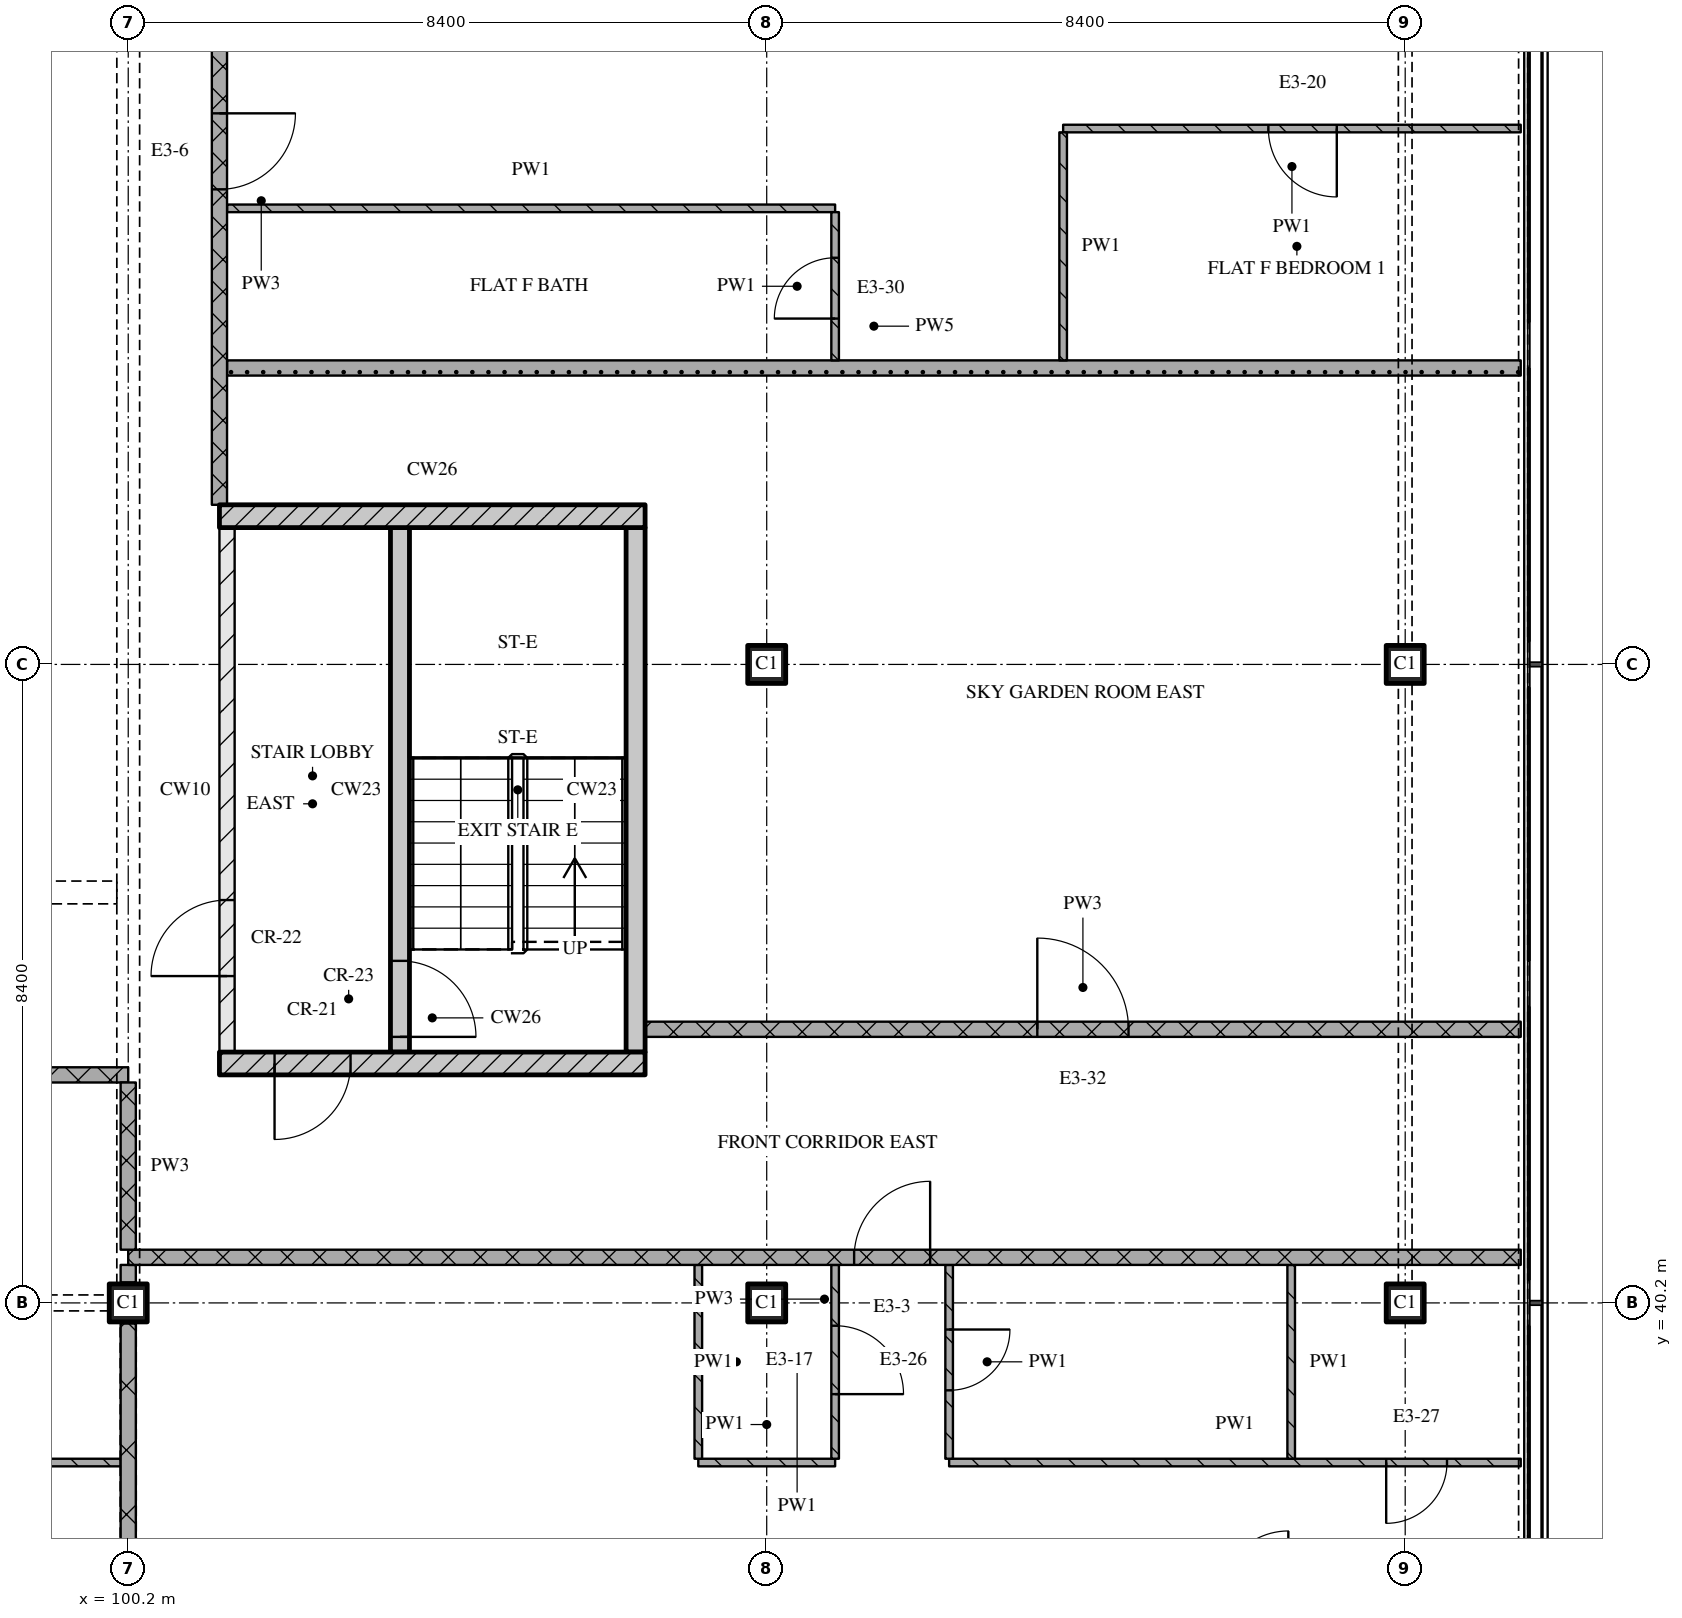
"""IFC4 building model, lengths in metres.
Left out: names, types, materials, properties, quantities, classifications, styles, units other than length and angle.
Written with IfcOpenShell. Run it as: python <this file> out.ifc"""

import sys

from ifc_helpers import new_model, si_unit, direction, frame, frame_2d, origin, origin_2d, place, context, subcontext, project, spatial, rectangle, extrude, element, fill, save


model = new_model("IFC4")
c1 = context("Model", 3, precision=1e-05, world=origin(), true_north=direction((0.0, 1.0)))
c2 = subcontext(c1, "Body", "Model", "MODEL_VIEW")
j1 = project(units=[si_unit("LENGTHUNIT", "METRE"), si_unit("PLANEANGLEUNIT", "RADIAN")], contexts=[c1])
p1 = place(None, origin())
s1 = spatial("IfcSite", under=j1, at=p1, CompositionType="ELEMENT")
p2 = place(p1, origin())
s2 = spatial("IfcBuilding", under=s1, at=p2, CompositionType="ELEMENT")
p3 = place(p2, frame((0.0, 0.0, 281.55)))
s3 = spatial("IfcBuildingStorey", under=s2, at=p3, CompositionType="ELEMENT", Elevation=281.55)
for number, where, z_axis, x_axis in (
    (1, (100.2, 40.2, 0.0), (0.0, 0.0, 1.0), (1.0, 0.0, 0.0)),
    (2, (108.6, 40.2, 0.0), (0.0, 0.0, 1.0), (1.0, 0.0, 0.0)),
    (3, (108.6, 48.6, 0.0), (0.0, 0.0, 1.0), (1.0, 0.0, 0.0)),
    (4, (117.0, 40.2, 0.0), (0.0, 0.0, 1.0), (1.0, 0.0, 0.0)),
    (5, (117.0, 48.6, 0.0), (0.0, 0.0, 1.0), (1.0, 0.0, 0.0)),
):
    element("IfcColumn", number, at=place(p3, frame(where, z_axis=z_axis, x_axis=x_axis)), inside=s3, PredefinedType="COLUMN", context=c2, shape_type="SweptSolid", body=[
        extrude(rectangle(XDim=0.5, YDim=0.5, at=origin_2d()), origin(), (0.0, 0.0, 1.0), 3.6),
    ])
p4 = place(p3, frame((101.4, 43.35, 0.0), z_axis=(0.0, 0.0, 1.0), x_axis=(1.0, 0.0, 0.0)))
e6 = element("IfcWall", 6, at=p4, inside=s3, PredefinedType="SOLIDWALL", context=c2, shape_type="SweptSolid", body=[
    extrude(rectangle(XDim=5.6, YDim=0.3, at=frame_2d((2.8, 0.0))), origin(), (0.0, 0.0, 1.0), 3.32),
])
p5 = place(p4, frame((0.725, 0.0, 0.0)))
e7 = element("IfcOpeningElement", 7, at=p5, cuts=e6, PredefinedType="OPENING", context=c2, shape_type="SweptSolid", body=[
    extrude(rectangle(XDim=1.0, YDim=2.1, at=frame_2d((0.5, 1.05))), frame((0.0, 0.16, 0.0), z_axis=(0.0, -1.0, 0.0), x_axis=(1.0, 0.0, 0.0)), (0.0, 0.0, 1.0), 0.32),
])
p6 = place(p3, frame((101.5, 43.5, 0.0), z_axis=(0.0, 0.0, 1.0), x_axis=(0.0, 1.0, 0.0)))
e8 = element("IfcWall", 8, at=p6, inside=s3, PredefinedType="PARTITIONING", context=c2, shape_type="SweptSolid", body=[
    extrude(rectangle(XDim=6.9, YDim=0.2, at=frame_2d((3.45, 0.0))), origin(), (0.0, 0.0, 1.0), 3.32),
])
p7 = place(p6, frame((1.0, 0.0, 0.0)))
e9 = element("IfcOpeningElement", 9, at=p7, cuts=e8, PredefinedType="OPENING", context=c2, shape_type="SweptSolid", body=[
    extrude(rectangle(XDim=1.0, YDim=2.1, at=frame_2d((0.5, 1.05))), frame((0.0, 0.11, 0.0), z_axis=(0.0, -1.0, 0.0), x_axis=(1.0, 0.0, 0.0)), (0.0, 0.0, 1.0), 0.22),
])
p8 = place(p3, frame((103.775, 43.5, 0.0), z_axis=(0.0, 0.0, 1.0), x_axis=(0.0, 1.0, 0.0)))
e10 = element("IfcWall", 10, at=p8, inside=s3, PredefinedType="SOLIDWALL", context=c2, shape_type="SweptSolid", body=[
    extrude(rectangle(XDim=6.9, YDim=0.25, at=frame_2d((3.45, 0.0))), origin(), (0.0, 0.0, 1.0), 3.32),
])
p9 = place(p8, frame((0.2, 0.0, 0.0)))
e11 = element("IfcOpeningElement", 11, at=p9, cuts=e10, PredefinedType="OPENING", context=c2, shape_type="SweptSolid", body=[
    extrude(rectangle(XDim=1.0, YDim=2.1, at=frame_2d((0.5, 1.05))), frame((0.0, 0.135, 0.0), z_axis=(0.0, -1.0, 0.0), x_axis=(1.0, 0.0, 0.0)), (0.0, 0.0, 1.0), 0.27),
])
p10 = place(p3, frame((106.875, 43.5, 0.0), z_axis=(0.0, 0.0, 1.0), x_axis=(0.0, 1.0, 0.0)))
e12 = element("IfcWall", 12, at=p10, inside=s3, PredefinedType="SOLIDWALL", context=c2, shape_type="SweptSolid", body=[
    extrude(rectangle(XDim=6.9, YDim=0.25, at=frame_2d((3.45, 0.0))), origin(), (0.0, 0.0, 1.0), 3.32),
])
p11 = place(p3, frame((101.4, 50.55, 0.0), z_axis=(0.0, 0.0, 1.0), x_axis=(1.0, 0.0, 0.0)))
e13 = element("IfcWall", 13, at=p11, inside=s3, PredefinedType="SOLIDWALL", context=c2, shape_type="SweptSolid", body=[
    extrude(rectangle(XDim=5.6, YDim=0.3, at=frame_2d((2.8, 0.0))), origin(), (0.0, 0.0, 1.0), 3.32),
])
p12 = place(p3, frame((90.6, 38.1, 0.0), z_axis=(0.0, 0.0, 1.0), x_axis=(1.0, 0.0, 0.0)))
e14 = element("IfcWall", 14, at=p12, inside=s3, PredefinedType="PARTITIONING", context=c2, shape_type="SweptSolid", body=[
    extrude(rectangle(XDim=9.5, YDim=0.1, at=frame_2d((4.75, 0.0))), origin(), (0.0, 0.0, 1.0), 3.32),
])
p13 = place(p12, frame((4.35, 0.0, 0.0)))
e15 = element("IfcOpeningElement", 15, at=p13, cuts=e14, PredefinedType="OPENING", context=c2, shape_type="SweptSolid", body=[
    extrude(rectangle(XDim=0.9, YDim=2.1, at=frame_2d((0.45, 1.05))), frame((0.0, 0.06, 0.0), z_axis=(0.0, -1.0, 0.0), x_axis=(1.0, 0.0, 0.0)), (0.0, 0.0, 1.0), 0.12),
])
p14 = place(p3, frame((107.7, 38.1, 0.0), z_axis=(0.0, 0.0, 1.0), x_axis=(1.0, 0.0, 0.0)))
e16 = element("IfcWall", 16, at=p14, inside=s3, PredefinedType="PARTITIONING", context=c2, shape_type="SweptSolid", body=[
    extrude(rectangle(XDim=1.8, YDim=0.1, at=frame_2d((0.9, 0.0))), origin(), (0.0, 0.0, 1.0), 3.32),
])
p15 = place(p3, frame((111.0, 38.1, 0.0), z_axis=(0.0, 0.0, 1.0), x_axis=(1.0, 0.0, 0.0)))
e17 = element("IfcWall", 17, at=p15, inside=s3, PredefinedType="PARTITIONING", context=c2, shape_type="SweptSolid", body=[
    extrude(rectangle(XDim=7.52, YDim=0.1, at=frame_2d((3.76, 0.0))), origin(), (0.0, 0.0, 1.0), 3.32),
])
p16 = place(p15, frame((5.75, 0.0, 0.0)))
e18 = element("IfcOpeningElement", 18, at=p16, cuts=e17, PredefinedType="OPENING", context=c2, shape_type="SweptSolid", body=[
    extrude(rectangle(XDim=0.8, YDim=2.1, at=frame_2d((0.4, 1.05))), frame((0.0, 0.06, 0.0), z_axis=(0.0, -1.0, 0.0), x_axis=(1.0, 0.0, 0.0)), (0.0, 0.0, 1.0), 0.12),
])
p17 = place(p3, frame((118.52, 40.8, 0.0), z_axis=(0.0, 0.0, 1.0), x_axis=(-1.0, 0.0, 0.0)))
e19 = element("IfcWall", 19, at=p17, inside=s3, PredefinedType="PARTITIONING", context=c2, shape_type="SweptSolid", body=[
    extrude(rectangle(XDim=18.32, YDim=0.2, at=frame_2d((9.16, 0.0))), origin(), (0.0, 0.0, 1.0), 3.32),
])
p18 = place(p17, frame((7.77, 0.0, 0.0)))
e20 = element("IfcOpeningElement", 20, at=p18, cuts=e19, PredefinedType="OPENING", context=c2, shape_type="SweptSolid", body=[
    extrude(rectangle(XDim=1.0, YDim=2.1, at=frame_2d((0.5, 1.05))), frame((0.0, 0.11, 0.0), z_axis=(0.0, -1.0, 0.0), x_axis=(1.0, 0.0, 0.0)), (0.0, 0.0, 1.0), 0.22),
])
p19 = place(p3, frame((100.2, 43.2, 0.0), z_axis=(0.0, 0.0, 1.0), x_axis=(-1.0, 0.0, 0.0)))
e21 = element("IfcWall", 21, at=p19, inside=s3, PredefinedType="PARTITIONING", context=c2, shape_type="SweptSolid", body=[
    extrude(rectangle(XDim=25.2, YDim=0.2, at=frame_2d((12.6, 0.0))), origin(), (0.0, 0.0, 1.0), 3.32),
])
p20 = place(p19, frame((17.35, 0.0, 0.0)))
e22 = element("IfcOpeningElement", 22, at=p20, cuts=e21, PredefinedType="OPENING", context=c2, shape_type="SweptSolid", body=[
    extrude(rectangle(XDim=1.0, YDim=2.1, at=frame_2d((0.5, 1.05))), frame((0.0, 0.11, 0.0), z_axis=(0.0, -1.0, 0.0), x_axis=(1.0, 0.0, 0.0)), (0.0, 0.0, 1.0), 0.22),
])
p21 = place(p3, frame((107.0, 43.8, 0.0), z_axis=(0.0, 0.0, 1.0), x_axis=(1.0, 0.0, 0.0)))
e23 = element("IfcWall", 23, at=p21, inside=s3, PredefinedType="PARTITIONING", context=c2, shape_type="SweptSolid", body=[
    extrude(rectangle(XDim=11.52, YDim=0.2, at=frame_2d((5.76, 0.0))), origin(), (0.0, 0.0, 1.0), 3.32),
])
p22 = place(p21, frame((5.16, 0.0, 0.0)))
e24 = element("IfcOpeningElement", 24, at=p22, cuts=e23, PredefinedType="OPENING", context=c2, shape_type="SweptSolid", body=[
    extrude(rectangle(XDim=1.2, YDim=2.1, at=frame_2d((0.6, 1.05))), frame((0.0, 0.11, 0.0), z_axis=(0.0, -1.0, 0.0), x_axis=(1.0, 0.0, 0.0)), (0.0, 0.0, 1.0), 0.22),
])
p23 = place(p3, frame((101.5, 52.5, 0.0), z_axis=(0.0, 0.0, 1.0), x_axis=(1.0, 0.0, 0.0)))
e25 = element("IfcWall", 25, at=p23, inside=s3, PredefinedType="PARTITIONING", context=c2, shape_type="SweptSolid", body=[
    extrude(rectangle(XDim=17.02, YDim=0.2, at=frame_2d((8.51, 0.0))), origin(), (0.0, 0.0, 1.0), 3.32),
])
p24 = place(p3, frame((101.5, 54.6, 0.0), z_axis=(0.0, 0.0, 1.0), x_axis=(1.0, 0.0, 0.0)))
e26 = element("IfcWall", 26, at=p24, inside=s3, PredefinedType="PARTITIONING", context=c2, shape_type="SweptSolid", body=[
    extrude(rectangle(XDim=8.0, YDim=0.1, at=frame_2d((4.0, 0.0))), origin(), (0.0, 0.0, 1.0), 3.32),
])
p25 = place(p3, frame((118.52, 55.65, 0.0), z_axis=(0.0, 0.0, 1.0), x_axis=(-1.0, 0.0, 0.0)))
e27 = element("IfcWall", 27, at=p25, inside=s3, PredefinedType="PARTITIONING", context=c2, shape_type="SweptSolid", body=[
    extrude(rectangle(XDim=6.02, YDim=0.1, at=frame_2d((3.01, 0.0))), origin(), (0.0, 0.0, 1.0), 3.32),
])
p26 = place(p25, frame((2.42, 0.0, 0.0)))
e28 = element("IfcOpeningElement", 28, at=p26, cuts=e27, PredefinedType="OPENING", context=c2, shape_type="SweptSolid", body=[
    extrude(rectangle(XDim=0.9, YDim=2.1, at=frame_2d((0.45, 1.05))), frame((0.0, 0.06, 0.0), z_axis=(0.0, -1.0, 0.0), x_axis=(1.0, 0.0, 0.0)), (0.0, 0.0, 1.0), 0.12),
])
p27 = place(p3, frame((100.2, 43.1, 0.0), z_axis=(0.0, 0.0, 1.0), x_axis=(0.0, -1.0, 0.0)))
e29 = element("IfcWall", 29, at=p27, inside=s3, PredefinedType="PARTITIONING", context=c2, shape_type="SweptSolid", body=[
    extrude(rectangle(XDim=2.2, YDim=0.2, at=frame_2d((1.1, 0.0))), origin(), (0.0, 0.0, 1.0), 2.53),
])
p28 = place(p3, frame((100.2, 39.93, 0.0), z_axis=(0.0, 0.0, 1.0), x_axis=(0.0, -1.0, 0.0)))
e30 = element("IfcWall", 30, at=p28, inside=s3, PredefinedType="PARTITIONING", context=c2, shape_type="SweptSolid", body=[
    extrude(rectangle(XDim=7.86, YDim=0.2, at=frame_2d((3.93, 0.0))), origin(), (0.0, 0.0, 1.0), 2.83),
])
p29 = place(p3, frame((100.2, 40.7, 0.0), z_axis=(0.0, 0.0, 1.0), x_axis=(0.0, -1.0, 0.0)))
e31 = element("IfcWall", 31, at=p29, inside=s3, PredefinedType="PARTITIONING", context=c2, shape_type="SweptSolid", body=[
    extrude(rectangle(XDim=0.23, YDim=0.2, at=frame_2d((0.115, 0.0))), origin(), (0.0, 0.0, 1.0), 3.32),
])
p30 = place(p3, frame((101.4, 58.7, 0.0), z_axis=(0.0, 0.0, 1.0), x_axis=(0.0, -1.0, 0.0)))
e32 = element("IfcWall", 32, at=p30, inside=s3, PredefinedType="PARTITIONING", context=c2, shape_type="SweptSolid", body=[
    extrude(rectangle(XDim=8.0, YDim=0.2, at=frame_2d((4.0, 0.0))), origin(), (0.0, 0.0, 1.0), 3.32),
])
p31 = place(p30, frame((2.85, 0.0, 0.0)))
e33 = element("IfcOpeningElement", 33, at=p31, cuts=e32, PredefinedType="OPENING", context=c2, shape_type="SweptSolid", body=[
    extrude(rectangle(XDim=1.0, YDim=2.1, at=frame_2d((0.5, 1.05))), frame((0.0, 0.11, 0.0), z_axis=(0.0, -1.0, 0.0), x_axis=(1.0, 0.0, 0.0)), (0.0, 0.0, 1.0), 0.22),
])
p32 = place(p3, frame((107.7, 40.7, 0.0), z_axis=(0.0, 0.0, 1.0), x_axis=(0.0, -1.0, 0.0)))
e34 = element("IfcWall", 34, at=p32, inside=s3, PredefinedType="PARTITIONING", context=c2, shape_type="SweptSolid", body=[
    extrude(rectangle(XDim=2.55, YDim=0.1, at=frame_2d((1.275, 0.0))), origin(), (0.0, 0.0, 1.0), 3.32),
])
p33 = place(p3, frame((109.5, 38.15, 0.0), z_axis=(0.0, 0.0, 1.0), x_axis=(0.0, 1.0, 0.0)))
e35 = element("IfcWall", 35, at=p33, inside=s3, PredefinedType="PARTITIONING", context=c2, shape_type="SweptSolid", body=[
    extrude(rectangle(XDim=2.55, YDim=0.1, at=frame_2d((1.275, 0.0))), origin(), (0.0, 0.0, 1.0), 3.32),
])
p34 = place(p33, frame((0.85, 0.0, 0.0)))
e36 = element("IfcOpeningElement", 36, at=p34, cuts=e35, PredefinedType="OPENING", context=c2, shape_type="SweptSolid", body=[
    extrude(rectangle(XDim=0.9, YDim=2.1, at=frame_2d((0.45, 1.05))), frame((0.0, 0.06, 0.0), z_axis=(0.0, -1.0, 0.0), x_axis=(1.0, 0.0, 0.0)), (0.0, 0.0, 1.0), 0.12),
])
p35 = place(p3, frame((109.5, 52.6, 0.0), z_axis=(0.0, 0.0, 1.0), x_axis=(0.0, 1.0, 0.0)))
e37 = element("IfcWall", 37, at=p35, inside=s3, PredefinedType="PARTITIONING", context=c2, shape_type="SweptSolid", body=[
    extrude(rectangle(XDim=1.95, YDim=0.1, at=frame_2d((0.975, 0.0))), origin(), (0.0, 0.0, 1.0), 3.32),
])
p36 = place(p35, frame((0.55, 0.0, 0.0)))
e38 = element("IfcOpeningElement", 38, at=p36, cuts=e37, PredefinedType="OPENING", context=c2, shape_type="SweptSolid", body=[
    extrude(rectangle(XDim=0.8, YDim=2.1, at=frame_2d((0.4, 1.05))), frame((0.0, 0.06, 0.0), z_axis=(0.0, -1.0, 0.0), x_axis=(1.0, 0.0, 0.0)), (0.0, 0.0, 1.0), 0.12),
])
p37 = place(p3, frame((111.0, 40.7, 0.0), z_axis=(0.0, 0.0, 1.0), x_axis=(0.0, -1.0, 0.0)))
e39 = element("IfcWall", 39, at=p37, inside=s3, PredefinedType="PARTITIONING", context=c2, shape_type="SweptSolid", body=[
    extrude(rectangle(XDim=2.55, YDim=0.1, at=frame_2d((1.275, 0.0))), origin(), (0.0, 0.0, 1.0), 3.32),
])
p38 = place(p37, frame((0.85, 0.0, 0.0)))
e40 = element("IfcOpeningElement", 40, at=p38, cuts=e39, PredefinedType="OPENING", context=c2, shape_type="SweptSolid", body=[
    extrude(rectangle(XDim=0.8, YDim=2.1, at=frame_2d((0.4, 1.05))), frame((0.0, 0.06, 0.0), z_axis=(0.0, -1.0, 0.0), x_axis=(1.0, 0.0, 0.0)), (0.0, 0.0, 1.0), 0.12),
])
p39 = place(p3, frame((112.5, 55.6, 0.0), z_axis=(0.0, 0.0, 1.0), x_axis=(0.0, -1.0, 0.0)))
e41 = element("IfcWall", 41, at=p39, inside=s3, PredefinedType="PARTITIONING", context=c2, shape_type="SweptSolid", body=[
    extrude(rectangle(XDim=3.0, YDim=0.1, at=frame_2d((1.5, 0.0))), origin(), (0.0, 0.0, 1.0), 3.32),
])
p40 = place(p3, frame((115.5, 40.7, 0.0), z_axis=(0.0, 0.0, 1.0), x_axis=(0.0, -1.0, 0.0)))
e42 = element("IfcWall", 42, at=p40, inside=s3, PredefinedType="PARTITIONING", context=c2, shape_type="SweptSolid", body=[
    extrude(rectangle(XDim=2.55, YDim=0.1, at=frame_2d((1.275, 0.0))), origin(), (0.0, 0.0, 1.0), 3.32),
])
p41 = place(p5, origin())
e43 = element("IfcDoor", 43, at=p41, inside=s3, OperationType="SINGLE_SWING_RIGHT", PredefinedType="DOOR", context=c2, shape_type="SweptSolid", body=[
    extrude(rectangle(XDim=1.0, YDim=2.1, at=frame_2d((0.5, 1.05))), frame((0.0, 0.025, 0.0), z_axis=(0.0, -1.0, 0.0), x_axis=(1.0, 0.0, 0.0)), (0.0, 0.0, 1.0), 0.05),
])
fill(e7, e43)
p42 = place(p9, origin())
e44 = element("IfcDoor", 44, at=p42, inside=s3, OperationType="SINGLE_SWING_RIGHT", PredefinedType="DOOR", context=c2, shape_type="SweptSolid", body=[
    extrude(rectangle(XDim=1.0, YDim=2.1, at=frame_2d((0.5, 1.05))), frame((0.0, 0.025, 0.0), z_axis=(0.0, -1.0, 0.0), x_axis=(1.0, 0.0, 0.0)), (0.0, 0.0, 1.0), 0.05),
])
fill(e11, e44)
p43 = place(p7, origin())
e45 = element("IfcDoor", 45, at=p43, inside=s3, OperationType="SINGLE_SWING_LEFT", PredefinedType="DOOR", context=c2, shape_type="SweptSolid", body=[
    extrude(rectangle(XDim=1.0, YDim=2.1, at=frame_2d((0.5, 1.05))), frame((0.0, 0.025, 0.0), z_axis=(0.0, -1.0, 0.0), x_axis=(1.0, 0.0, 0.0)), (0.0, 0.0, 1.0), 0.05),
])
fill(e9, e45)
p44 = place(p16, origin())
e46 = element("IfcDoor", 46, at=p44, inside=s3, OperationType="SINGLE_SWING_RIGHT", PredefinedType="DOOR", context=c2, shape_type="SweptSolid", body=[
    extrude(rectangle(XDim=0.8, YDim=2.1, at=frame_2d((0.4, 1.05))), frame((0.0, 0.025, 0.0), z_axis=(0.0, -1.0, 0.0), x_axis=(1.0, 0.0, 0.0)), (0.0, 0.0, 1.0), 0.05),
])
fill(e18, e46)
p45 = place(p18, origin())
e47 = element("IfcDoor", 47, at=p45, inside=s3, OperationType="SINGLE_SWING_RIGHT", PredefinedType="DOOR", context=c2, shape_type="SweptSolid", body=[
    extrude(rectangle(XDim=1.0, YDim=2.1, at=frame_2d((0.5, 1.05))), frame((0.0, 0.025, 0.0), z_axis=(0.0, -1.0, 0.0), x_axis=(1.0, 0.0, 0.0)), (0.0, 0.0, 1.0), 0.05),
])
fill(e20, e47)
p46 = place(p22, origin())
e48 = element("IfcDoor", 48, at=p46, inside=s3, OperationType="SINGLE_SWING_LEFT", PredefinedType="DOOR", context=c2, shape_type="SweptSolid", body=[
    extrude(rectangle(XDim=1.2, YDim=2.1, at=frame_2d((0.6, 1.05))), frame((0.0, 0.025, 0.0), z_axis=(0.0, -1.0, 0.0), x_axis=(1.0, 0.0, 0.0)), (0.0, 0.0, 1.0), 0.05),
])
fill(e24, e48)
p47 = place(p26, origin())
e49 = element("IfcDoor", 49, at=p47, inside=s3, OperationType="SINGLE_SWING_LEFT", PredefinedType="DOOR", context=c2, shape_type="SweptSolid", body=[
    extrude(rectangle(XDim=0.9, YDim=2.1, at=frame_2d((0.45, 1.05))), frame((0.0, 0.025, 0.0), z_axis=(0.0, -1.0, 0.0), x_axis=(1.0, 0.0, 0.0)), (0.0, 0.0, 1.0), 0.05),
])
fill(e28, e49)
p48 = place(p31, origin())
e50 = element("IfcDoor", 50, at=p48, inside=s3, OperationType="SINGLE_SWING_LEFT", PredefinedType="DOOR", context=c2, shape_type="SweptSolid", body=[
    extrude(rectangle(XDim=1.0, YDim=2.1, at=frame_2d((0.5, 1.05))), frame((0.0, 0.025, 0.0), z_axis=(0.0, -1.0, 0.0), x_axis=(1.0, 0.0, 0.0)), (0.0, 0.0, 1.0), 0.05),
])
fill(e33, e50)
p49 = place(p34, origin())
e51 = element("IfcDoor", 51, at=p49, inside=s3, OperationType="SINGLE_SWING_RIGHT", PredefinedType="DOOR", context=c2, shape_type="SweptSolid", body=[
    extrude(rectangle(XDim=0.9, YDim=2.1, at=frame_2d((0.45, 1.05))), frame((0.0, 0.025, 0.0), z_axis=(0.0, -1.0, 0.0), x_axis=(1.0, 0.0, 0.0)), (0.0, 0.0, 1.0), 0.05),
])
fill(e36, e51)
p50 = place(p36, origin())
e52 = element("IfcDoor", 52, at=p50, inside=s3, OperationType="SINGLE_SWING_LEFT", PredefinedType="DOOR", context=c2, shape_type="SweptSolid", body=[
    extrude(rectangle(XDim=0.8, YDim=2.1, at=frame_2d((0.4, 1.05))), frame((0.0, 0.025, 0.0), z_axis=(0.0, -1.0, 0.0), x_axis=(1.0, 0.0, 0.0)), (0.0, 0.0, 1.0), 0.05),
])
fill(e38, e52)
p51 = place(p38, origin())
e53 = element("IfcDoor", 53, at=p51, inside=s3, OperationType="SINGLE_SWING_LEFT", PredefinedType="DOOR", context=c2, shape_type="SweptSolid", body=[
    extrude(rectangle(XDim=0.8, YDim=2.1, at=frame_2d((0.4, 1.05))), frame((0.0, 0.025, 0.0), z_axis=(0.0, -1.0, 0.0), x_axis=(1.0, 0.0, 0.0)), (0.0, 0.0, 1.0), 0.05),
])
fill(e40, e53)
save(model, sys.argv[1])
